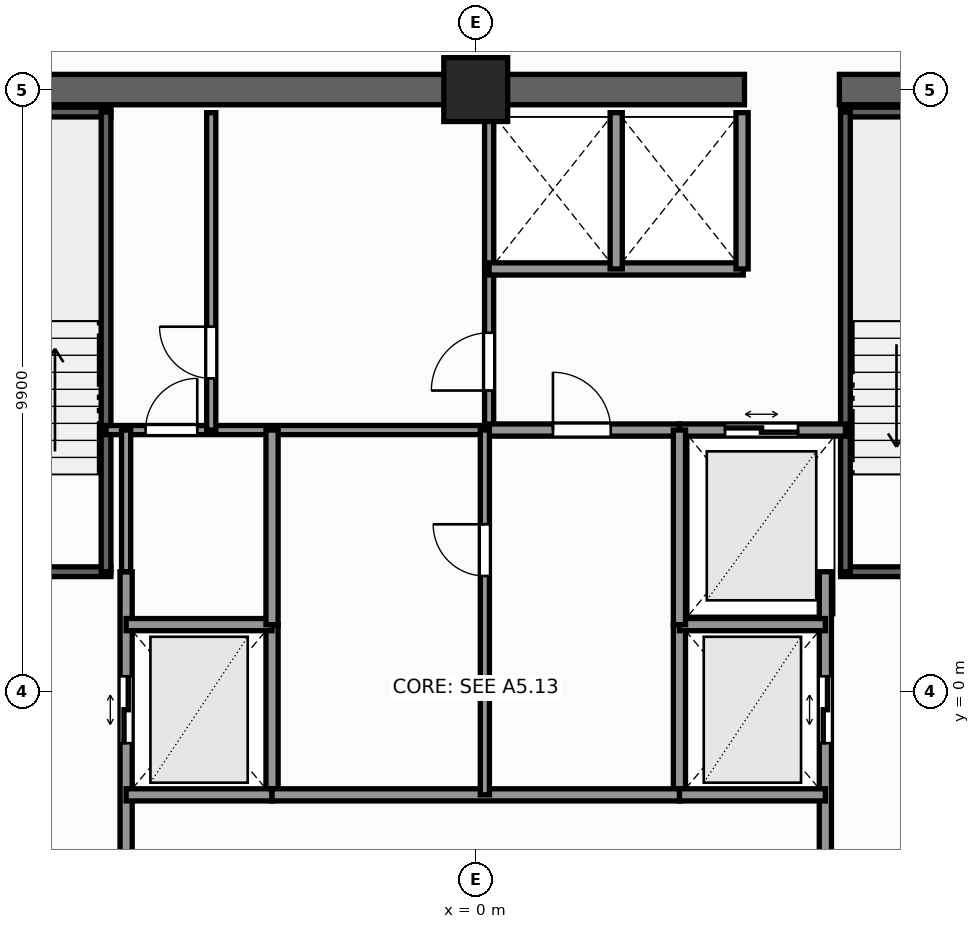
"""IFC4 building model, lengths in metres.
Left out: names, types, materials, properties, quantities, classifications, styles, units other than length and angle.
Written with IfcOpenShell. Run it as: python <this file> out.ifc"""

import sys

from ifc_helpers import new_model, si_unit, direction, frame, frame_2d, origin, origin_2d, place, context, subcontext, project, spatial, rectangle, extrude, element, fill, save


model = new_model("IFC4")
c1 = context("Model", 3, precision=1e-05, world=origin(), true_north=direction((0.0, 1.0)))
c2 = subcontext(c1, "Body", "Model", "MODEL_VIEW")
j1 = project(units=[si_unit("LENGTHUNIT", "METRE"), si_unit("PLANEANGLEUNIT", "RADIAN")], contexts=[c1])
p1 = place(None, origin())
s1 = spatial("IfcSite", under=j1, at=p1, CompositionType="ELEMENT")
p2 = place(p1, origin())
s2 = spatial("IfcBuilding", under=s1, at=p2, CompositionType="ELEMENT")
p3 = place(p2, frame((0.0, 0.0, 193.2)))
s3 = spatial("IfcBuildingStorey", under=s2, at=p3, CompositionType="ELEMENT", Elevation=193.2)
p4 = place(p3, frame((-10.15, 9.9, 0.0), z_axis=(0.0, 0.0, 1.0), x_axis=(1.0, 0.0, 0.0)))
e1 = element("IfcWall", 1, at=p4, inside=s3, PredefinedType="SHEAR", context=c2, shape_type="SweptSolid", body=[
    extrude(rectangle(XDim=14.57, YDim=0.5, at=frame_2d((7.285, 0.0))), origin(), (0.0, 0.0, 1.0), 3.3),
])
p5 = place(p3, frame((5.98, 9.9, 0.0), z_axis=(0.0, 0.0, 1.0), x_axis=(1.0, 0.0, 0.0)))
e2 = element("IfcWall", 2, at=p5, inside=s3, PredefinedType="SHEAR", context=c2, shape_type="SweptSolid", body=[
    extrude(rectangle(XDim=4.17, YDim=0.5, at=frame_2d((2.085, 0.0))), origin(), (0.0, 0.0, 1.0), 3.3),
])
p6 = place(p3, frame((0.0, 9.9, 0.0), z_axis=(0.0, 0.0, 1.0), x_axis=(1.0, 0.0, 0.0)))
e3 = element("IfcColumn", 3, at=p6, inside=s3, PredefinedType="COLUMN", context=c2, shape_type="SweptSolid", body=[
    extrude(rectangle(XDim=1.05, YDim=1.05, at=origin_2d()), origin(), (0.0, 0.0, 1.0), 3.3),
])
p7 = place(p3, frame((-9.52, 1.97, 0.0), z_axis=(0.0, 0.0, 1.0), x_axis=(1.0, 0.0, 0.0)))
e4 = element("IfcWall", 4, at=p7, inside=s3, PredefinedType="SHEAR", context=c2, shape_type="SweptSolid", body=[
    extrude(rectangle(XDim=3.52, YDim=0.16, at=frame_2d((1.76, 0.0))), origin(), (0.0, 0.0, 1.0), 3.3),
])
p8 = place(p7, frame((1.15, 0.0, 0.0)))
e5 = element("IfcOpeningElement", 5, at=p8, cuts=e4, PredefinedType="OPENING", context=c2, shape_type="SweptSolid", body=[
    extrude(rectangle(XDim=1.1, YDim=2.2, at=frame_2d((0.55, 1.1))), frame((0.0, 0.09, 0.0), z_axis=(0.0, -1.0, 0.0), x_axis=(1.0, 0.0, 0.0)), (0.0, 0.0, 1.0), 0.18),
])
p9 = place(p3, frame((-9.52, 9.53, 0.0), z_axis=(0.0, 0.0, 1.0), x_axis=(1.0, 0.0, 0.0)))
e6 = element("IfcWall", 6, at=p9, inside=s3, PredefinedType="SHEAR", context=c2, shape_type="SweptSolid", body=[
    extrude(rectangle(XDim=3.52, YDim=0.16, at=frame_2d((1.76, 0.0))), origin(), (0.0, 0.0, 1.0), 3.3),
])
p10 = place(p3, frame((-6.08, 1.97, 0.0), z_axis=(0.0, 0.0, 1.0), x_axis=(0.0, 1.0, 0.0)))
e7 = element("IfcWall", 7, at=p10, inside=s3, PredefinedType="SHEAR", context=c2, shape_type="SweptSolid", body=[
    extrude(rectangle(XDim=7.56, YDim=0.16, at=frame_2d((3.78, 0.0))), origin(), (0.0, 0.0, 1.0), 3.3),
])
p11 = place(p3, frame((6.0, 1.97, 0.0), z_axis=(0.0, 0.0, 1.0), x_axis=(1.0, 0.0, 0.0)))
e8 = element("IfcWall", 8, at=p11, inside=s3, PredefinedType="SHEAR", context=c2, shape_type="SweptSolid", body=[
    extrude(rectangle(XDim=3.52, YDim=0.16, at=frame_2d((1.76, 0.0))), origin(), (0.0, 0.0, 1.0), 3.3),
])
p12 = place(p11, frame((1.15, 0.0, 0.0)))
e9 = element("IfcOpeningElement", 9, at=p12, cuts=e8, PredefinedType="OPENING", context=c2, shape_type="SweptSolid", body=[
    extrude(rectangle(XDim=1.1, YDim=2.2, at=frame_2d((0.55, 1.1))), frame((0.0, 0.09, 0.0), z_axis=(0.0, -1.0, 0.0), x_axis=(1.0, 0.0, 0.0)), (0.0, 0.0, 1.0), 0.18),
])
p13 = place(p3, frame((6.0, 9.53, 0.0), z_axis=(0.0, 0.0, 1.0), x_axis=(1.0, 0.0, 0.0)))
e10 = element("IfcWall", 10, at=p13, inside=s3, PredefinedType="SHEAR", context=c2, shape_type="SweptSolid", body=[
    extrude(rectangle(XDim=3.52, YDim=0.16, at=frame_2d((1.76, 0.0))), origin(), (0.0, 0.0, 1.0), 3.3),
])
p14 = place(p3, frame((6.08, 1.97, 0.0), z_axis=(0.0, 0.0, 1.0), x_axis=(0.0, 1.0, 0.0)))
e11 = element("IfcWall", 11, at=p14, inside=s3, PredefinedType="SHEAR", context=c2, shape_type="SweptSolid", body=[
    extrude(rectangle(XDim=7.56, YDim=0.16, at=frame_2d((3.78, 0.0))), origin(), (0.0, 0.0, 1.0), 3.3),
])
p15 = place(p3, frame((-5.75, -3.6, 0.0), z_axis=(0.0, 0.0, 1.0), x_axis=(0.0, 1.0, 0.0)))
e12 = element("IfcWall", 12, at=p15, inside=s3, PredefinedType="SOLIDWALL", context=c2, shape_type="SweptSolid", body=[
    extrude(rectangle(XDim=5.57, YDim=0.2, at=frame_2d((2.785, 0.0))), origin(), (0.0, 0.0, 1.0), 3.08),
])
p16 = place(p15, frame((2.75, 0.0, 0.0)))
e13 = element("IfcOpeningElement", 13, at=p16, cuts=e12, PredefinedType="OPENING", context=c2, shape_type="SweptSolid", body=[
    extrude(rectangle(XDim=1.1, YDim=2.2, at=frame_2d((0.55, 1.1))), frame((0.0, 0.11, 0.0), z_axis=(0.0, -1.0, 0.0), x_axis=(1.0, 0.0, 0.0)), (0.0, 0.0, 1.0), 0.22),
])
p17 = place(p3, frame((-3.35, -1.7, 0.0), z_axis=(0.0, 0.0, 1.0), x_axis=(0.0, 1.0, 0.0)))
e14 = element("IfcWall", 14, at=p17, inside=s3, PredefinedType="SOLIDWALL", context=c2, shape_type="SweptSolid", body=[
    extrude(rectangle(XDim=2.8, YDim=0.2, at=frame_2d((1.4, 0.0))), origin(), (0.0, 0.0, 1.0), 3.08),
])
for number, where, z_axis, x_axis in (
    (15, (-5.75, -1.7, 0.0), (0.0, 0.0, 1.0), (1.0, 0.0, 0.0)),
    (16, (-5.75, 1.1, 0.0), (0.0, 0.0, 1.0), (1.0, 0.0, 0.0)),
):
    element("IfcWall", number, at=place(p3, frame(where, z_axis=z_axis, x_axis=x_axis)), inside=s3, PredefinedType="SOLIDWALL", context=c2, shape_type="SweptSolid", body=[
        extrude(rectangle(XDim=2.4, YDim=0.2, at=frame_2d((1.2, 0.0))), origin(), (0.0, 0.0, 1.0), 3.08),
    ])
p18 = place(p3, frame((5.75, -3.6, 0.0), z_axis=(0.0, 0.0, 1.0), x_axis=(0.0, 1.0, 0.0)))
e17 = element("IfcWall", 17, at=p18, inside=s3, PredefinedType="SOLIDWALL", context=c2, shape_type="SweptSolid", body=[
    extrude(rectangle(XDim=5.57, YDim=0.2, at=frame_2d((2.785, 0.0))), origin(), (0.0, 0.0, 1.0), 3.08),
])
p19 = place(p18, frame((2.75, 0.0, 0.0)))
e18 = element("IfcOpeningElement", 18, at=p19, cuts=e17, PredefinedType="OPENING", context=c2, shape_type="SweptSolid", body=[
    extrude(rectangle(XDim=1.1, YDim=2.2, at=frame_2d((0.55, 1.1))), frame((0.0, 0.11, 0.0), z_axis=(0.0, -1.0, 0.0), x_axis=(1.0, 0.0, 0.0)), (0.0, 0.0, 1.0), 0.22),
])
p20 = place(p3, frame((3.35, -1.7, 0.0), z_axis=(0.0, 0.0, 1.0), x_axis=(0.0, 1.0, 0.0)))
e19 = element("IfcWall", 19, at=p20, inside=s3, PredefinedType="SOLIDWALL", context=c2, shape_type="SweptSolid", body=[
    extrude(rectangle(XDim=2.8, YDim=0.2, at=frame_2d((1.4, 0.0))), origin(), (0.0, 0.0, 1.0), 3.08),
])
for number, where, z_axis, x_axis in (
    (20, (3.35, -1.7, 0.0), (0.0, 0.0, 1.0), (1.0, 0.0, 0.0)),
    (21, (3.35, 1.1, 0.0), (0.0, 0.0, 1.0), (1.0, 0.0, 0.0)),
):
    element("IfcWall", number, at=place(p3, frame(where, z_axis=z_axis, x_axis=x_axis)), inside=s3, PredefinedType="SOLIDWALL", context=c2, shape_type="SweptSolid", body=[
        extrude(rectangle(XDim=2.4, YDim=0.2, at=frame_2d((1.2, 0.0))), origin(), (0.0, 0.0, 1.0), 3.08),
    ])
p21 = place(p3, frame((3.35, 4.3, 0.0), z_axis=(0.0, 0.0, 1.0), x_axis=(1.0, 0.0, 0.0)))
e22 = element("IfcWall", 22, at=p21, inside=s3, PredefinedType="SOLIDWALL", context=c2, shape_type="SweptSolid", body=[
    extrude(rectangle(XDim=2.73, YDim=0.2, at=frame_2d((1.365, 0.0))), origin(), (0.0, 0.0, 1.0), 3.08),
])
p22 = place(p21, frame((0.75, 0.0, 0.0)))
e23 = element("IfcOpeningElement", 23, at=p22, cuts=e22, PredefinedType="OPENING", context=c2, shape_type="SweptSolid", body=[
    extrude(rectangle(XDim=1.2, YDim=2.25, at=frame_2d((0.6, 1.125))), frame((0.0, 0.11, 0.0), z_axis=(0.0, -1.0, 0.0), x_axis=(1.0, 0.0, 0.0)), (0.0, 0.0, 1.0), 0.22),
])
p23 = place(p3, frame((-6.08, 4.3, 0.0), z_axis=(0.0, 0.0, 1.0), x_axis=(1.0, 0.0, 0.0)))
e24 = element("IfcWall", 24, at=p23, inside=s3, PredefinedType="PARTITIONING", context=c2, shape_type="SweptSolid", body=[
    extrude(rectangle(XDim=6.3, YDim=0.15, at=frame_2d((3.15, 0.0))), origin(), (0.0, 0.0, 1.0), 3.08),
])
p24 = place(p23, frame((0.65, 0.0, 0.0)))
e25 = element("IfcOpeningElement", 25, at=p24, cuts=e24, PredefinedType="OPENING", context=c2, shape_type="SweptSolid", body=[
    extrude(rectangle(XDim=0.85, YDim=2.03, at=frame_2d((0.425, 1.015))), frame((0.0, 0.085, 0.0), z_axis=(0.0, -1.0, 0.0), x_axis=(1.0, 0.0, 0.0)), (0.0, 0.0, 1.0), 0.17),
])
p25 = place(p3, frame((0.22, 4.3, 0.0), z_axis=(0.0, 0.0, 1.0), x_axis=(0.0, 1.0, 0.0)))
e26 = element("IfcWall", 26, at=p25, inside=s3, PredefinedType="PARTITIONING", context=c2, shape_type="SweptSolid", body=[
    extrude(rectangle(XDim=5.22, YDim=0.15, at=frame_2d((2.61, 0.0))), origin(), (0.0, 0.0, 1.0), 3.08),
])
p26 = place(p25, frame((0.65, 0.0, 0.0)))
e27 = element("IfcOpeningElement", 27, at=p26, cuts=e26, PredefinedType="OPENING", context=c2, shape_type="SweptSolid", body=[
    extrude(rectangle(XDim=0.95, YDim=2.06, at=frame_2d((0.475, 1.03))), frame((0.0, 0.085, 0.0), z_axis=(0.0, -1.0, 0.0), x_axis=(1.0, 0.0, 0.0)), (0.0, 0.0, 1.0), 0.17),
])
p27 = place(p3, frame((-4.35, 4.3, 0.0), z_axis=(0.0, 0.0, 1.0), x_axis=(0.0, 1.0, 0.0)))
e28 = element("IfcWall", 28, at=p27, inside=s3, PredefinedType="PARTITIONING", context=c2, shape_type="SweptSolid", body=[
    extrude(rectangle(XDim=5.22, YDim=0.15, at=frame_2d((2.61, 0.0))), origin(), (0.0, 0.0, 1.0), 3.08),
])
p28 = place(p27, frame((0.85, 0.0, 0.0)))
e29 = element("IfcOpeningElement", 29, at=p28, cuts=e28, PredefinedType="OPENING", context=c2, shape_type="SweptSolid", body=[
    extrude(rectangle(XDim=0.85, YDim=2.03, at=frame_2d((0.425, 1.015))), frame((0.0, 0.085, 0.0), z_axis=(0.0, -1.0, 0.0), x_axis=(1.0, 0.0, 0.0)), (0.0, 0.0, 1.0), 0.17),
])
p29 = place(p3, frame((0.22, 6.95, 0.0), z_axis=(0.0, 0.0, 1.0), x_axis=(1.0, 0.0, 0.0)))
e30 = element("IfcWall", 30, at=p29, inside=s3, PredefinedType="SOLIDWALL", context=c2, shape_type="SweptSolid", body=[
    extrude(rectangle(XDim=4.18, YDim=0.2, at=frame_2d((2.09, 0.0))), origin(), (0.0, 0.0, 1.0), 3.08),
])
for number, where, z_axis, x_axis in (
    (31, (4.38, 6.95, 0.0), (0.0, 0.0, 1.0), (0.0, 1.0, 0.0)),
    (32, (2.31, 6.95, 0.0), (0.0, 0.0, 1.0), (0.0, 1.0, 0.0)),
):
    element("IfcWall", number, at=place(p3, frame(where, z_axis=z_axis, x_axis=x_axis)), inside=s3, PredefinedType="SOLIDWALL", context=c2, shape_type="SweptSolid", body=[
        extrude(rectangle(XDim=2.57, YDim=0.2, at=frame_2d((1.285, 0.0))), origin(), (0.0, 0.0, 1.0), 3.08),
    ])
p30 = place(p3, frame((0.22, 4.3, 0.0), z_axis=(0.0, 0.0, 1.0), x_axis=(1.0, 0.0, 0.0)))
e33 = element("IfcWall", 33, at=p30, inside=s3, PredefinedType="SOLIDWALL", context=c2, shape_type="SweptSolid", body=[
    extrude(rectangle(XDim=3.13, YDim=0.2, at=frame_2d((1.565, 0.0))), origin(), (0.0, 0.0, 1.0), 3.08),
])
p31 = place(p30, frame((1.05, 0.0, 0.0)))
e34 = element("IfcOpeningElement", 34, at=p31, cuts=e33, PredefinedType="OPENING", context=c2, shape_type="SweptSolid", body=[
    extrude(rectangle(XDim=0.95, YDim=2.06, at=frame_2d((0.475, 1.03))), frame((0.0, 0.11, 0.0), z_axis=(0.0, -1.0, 0.0), x_axis=(1.0, 0.0, 0.0)), (0.0, 0.0, 1.0), 0.22),
])
p32 = place(p3, frame((-3.35, -1.7, 0.0), z_axis=(0.0, 0.0, 1.0), x_axis=(1.0, 0.0, 0.0)))
e35 = element("IfcWall", 35, at=p32, inside=s3, PredefinedType="SOLIDWALL", context=c2, shape_type="SweptSolid", body=[
    extrude(rectangle(XDim=6.7, YDim=0.2, at=frame_2d((3.35, 0.0))), origin(), (0.0, 0.0, 1.0), 3.08),
])
for number, where, z_axis, x_axis in (
    (36, (-3.35, 1.1, 0.0), (0.0, 0.0, 1.0), (0.0, 1.0, 0.0)),
    (37, (3.35, 1.1, 0.0), (0.0, 0.0, 1.0), (0.0, 1.0, 0.0)),
):
    element("IfcWall", number, at=place(p3, frame(where, z_axis=z_axis, x_axis=x_axis)), inside=s3, PredefinedType="SOLIDWALL", context=c2, shape_type="SweptSolid", body=[
        extrude(rectangle(XDim=3.2, YDim=0.2, at=frame_2d((1.6, 0.0))), origin(), (0.0, 0.0, 1.0), 3.08),
    ])
p33 = place(p3, frame((0.15, -1.7, 0.0), z_axis=(0.0, 0.0, 1.0), x_axis=(0.0, 1.0, 0.0)))
e38 = element("IfcWall", 38, at=p33, inside=s3, PredefinedType="PARTITIONING", context=c2, shape_type="SweptSolid", body=[
    extrude(rectangle(XDim=6.0, YDim=0.15, at=frame_2d((3.0, 0.0))), origin(), (0.0, 0.0, 1.0), 3.08),
])
p34 = place(p33, frame((3.6, 0.0, 0.0)))
e39 = element("IfcOpeningElement", 39, at=p34, cuts=e38, PredefinedType="OPENING", context=c2, shape_type="SweptSolid", body=[
    extrude(rectangle(XDim=0.85, YDim=2.03, at=frame_2d((0.425, 1.015))), frame((0.0, 0.085, 0.0), z_axis=(0.0, -1.0, 0.0), x_axis=(1.0, 0.0, 0.0)), (0.0, 0.0, 1.0), 0.17),
])
p35 = place(p3, frame((-5.75, 1.97, 0.0), z_axis=(0.0, 0.0, 1.0), x_axis=(0.0, 1.0, 0.0)))
e40 = element("IfcWall", 40, at=p35, inside=s3, PredefinedType="PARTITIONING", context=c2, shape_type="SweptSolid", body=[
    extrude(rectangle(XDim=2.33, YDim=0.15, at=frame_2d((1.165, 0.0))), origin(), (0.0, 0.0, 1.0), 3.08),
])
p36 = place(p16, origin())
e41 = element("IfcDoor", 41, at=p36, inside=s3, OperationType="DOUBLE_DOOR_SLIDING", PredefinedType="DOOR", context=c2, shape_type="SweptSolid", body=[
    extrude(rectangle(XDim=1.1, YDim=2.2, at=frame_2d((0.55, 1.1))), frame((0.0, 0.025, 0.0), z_axis=(0.0, -1.0, 0.0), x_axis=(1.0, 0.0, 0.0)), (0.0, 0.0, 1.0), 0.05),
])
fill(e13, e41)
p37 = place(p19, origin())
e42 = element("IfcDoor", 42, at=p37, inside=s3, OperationType="DOUBLE_DOOR_SLIDING", PredefinedType="DOOR", context=c2, shape_type="SweptSolid", body=[
    extrude(rectangle(XDim=1.1, YDim=2.2, at=frame_2d((0.55, 1.1))), frame((0.0, 0.025, 0.0), z_axis=(0.0, -1.0, 0.0), x_axis=(1.0, 0.0, 0.0)), (0.0, 0.0, 1.0), 0.05),
])
fill(e18, e42)
p38 = place(p22, origin())
e43 = element("IfcDoor", 43, at=p38, inside=s3, OperationType="DOUBLE_DOOR_SLIDING", PredefinedType="DOOR", context=c2, shape_type="SweptSolid", body=[
    extrude(rectangle(XDim=1.2, YDim=2.25, at=frame_2d((0.6, 1.125))), frame((0.0, 0.025, 0.0), z_axis=(0.0, -1.0, 0.0), x_axis=(1.0, 0.0, 0.0)), (0.0, 0.0, 1.0), 0.05),
])
fill(e23, e43)
p39 = place(p26, origin())
e44 = element("IfcDoor", 44, at=p39, inside=s3, OperationType="SINGLE_SWING_LEFT", PredefinedType="DOOR", context=c2, shape_type="SweptSolid", body=[
    extrude(rectangle(XDim=0.95, YDim=2.06, at=frame_2d((0.475, 1.03))), frame((0.0, 0.025, 0.0), z_axis=(0.0, -1.0, 0.0), x_axis=(1.0, 0.0, 0.0)), (0.0, 0.0, 1.0), 0.05),
])
fill(e27, e44)
p40 = place(p28, origin())
e45 = element("IfcDoor", 45, at=p40, inside=s3, OperationType="SINGLE_SWING_RIGHT", PredefinedType="DOOR", context=c2, shape_type="SweptSolid", body=[
    extrude(rectangle(XDim=0.85, YDim=2.03, at=frame_2d((0.425, 1.015))), frame((0.0, 0.025, 0.0), z_axis=(0.0, -1.0, 0.0), x_axis=(1.0, 0.0, 0.0)), (0.0, 0.0, 1.0), 0.05),
])
fill(e29, e45)
p41 = place(p31, origin())
e46 = element("IfcDoor", 46, at=p41, inside=s3, OperationType="SINGLE_SWING_LEFT", PredefinedType="DOOR", context=c2, shape_type="SweptSolid", body=[
    extrude(rectangle(XDim=0.95, YDim=2.06, at=frame_2d((0.475, 1.03))), frame((0.0, 0.025, 0.0), z_axis=(0.0, -1.0, 0.0), x_axis=(1.0, 0.0, 0.0)), (0.0, 0.0, 1.0), 0.05),
])
fill(e34, e46)
p42 = place(p34, origin())
e47 = element("IfcDoor", 47, at=p42, inside=s3, OperationType="SINGLE_SWING_RIGHT", PredefinedType="DOOR", context=c2, shape_type="SweptSolid", body=[
    extrude(rectangle(XDim=0.85, YDim=2.03, at=frame_2d((0.425, 1.015))), frame((0.0, 0.025, 0.0), z_axis=(0.0, -1.0, 0.0), x_axis=(1.0, 0.0, 0.0)), (0.0, 0.0, 1.0), 0.05),
])
fill(e39, e47)
p43 = place(p24, origin())
e48 = element("IfcDoor", 48, at=p43, inside=s3, OperationType="SINGLE_SWING_RIGHT", PredefinedType="DOOR", context=c2, shape_type="SweptSolid", body=[
    extrude(rectangle(XDim=0.85, YDim=2.03, at=frame_2d((0.425, 1.015))), frame((0.0, 0.025, 0.0), z_axis=(0.0, -1.0, 0.0), x_axis=(1.0, 0.0, 0.0)), (0.0, 0.0, 1.0), 0.05),
])
fill(e25, e48)
save(model, sys.argv[1])
